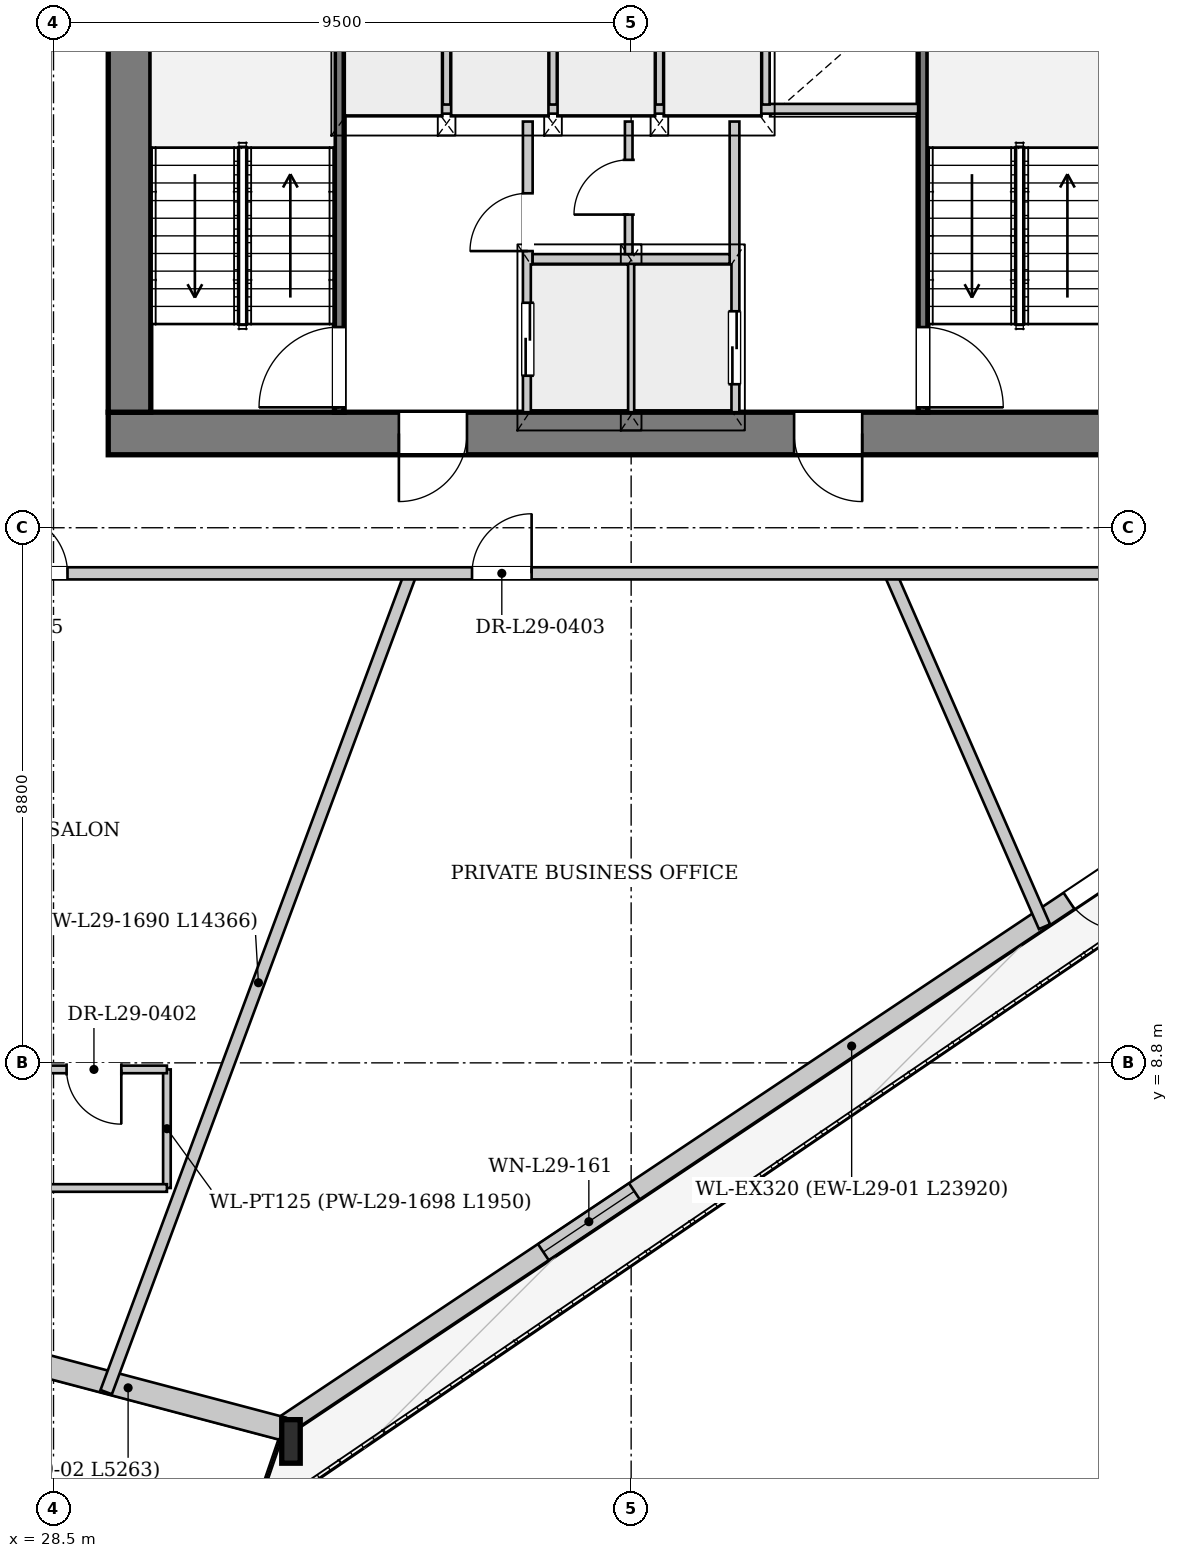
"""IFC4 building model, lengths in metres.
Left out: names, types, materials, properties, quantities, classifications, styles, units other than length and angle.
Written with IfcOpenShell. Run it as: python <this file> out.ifc"""

import sys

from ifc_helpers import new_model, si_unit, direction, frame, frame_2d, origin, origin_2d, place, context, subcontext, project, spatial, rectangle, i_section, extrude, source, transform, mapped, element, fill, save


model = new_model("IFC4")
c1 = context("Model", 3, precision=1e-05, world=origin(), true_north=direction((0.0, 1.0)))
c2 = subcontext(c1, "Body", "Model", "MODEL_VIEW")
j1 = project(units=[si_unit("LENGTHUNIT", "METRE"), si_unit("PLANEANGLEUNIT", "RADIAN")], contexts=[c1])
p1 = place(None, origin())
s1 = spatial("IfcSite", under=j1, at=p1, CompositionType="ELEMENT")
p2 = place(p1, origin())
s2 = spatial("IfcBuilding", under=s1, at=p2, CompositionType="ELEMENT")
p3 = place(p2, frame((0.0, 0.0, 112.8)))
s3 = spatial("IfcBuildingStorey", under=s2, at=p3, CompositionType="ELEMENT", Elevation=112.8)
m1 = source(origin(), c2, "Body", "SweptSolid", [
    extrude(i_section(OverallWidth=0.304, OverallDepth=0.716, WebThickness=0.021, FlangeThickness=0.04, at=origin_2d()), origin(), (0.0, 0.0, 1.0), 3.405),
])
p4 = place(p3, frame((32.222, 2.6, 0.0), z_axis=(0.107475750948, -0.014841547996, 0.994096922544), x_axis=(0.136793930518, 0.990599525829, 0.0)))
e1 = element("IfcColumn", 1, at=p4, inside=s3, PredefinedType="COLUMN", context=c2, shape_type="MappedRepresentation", body=[
    mapped(m1, transform((0.0, 0.0, 0.0), x_axis=(1.0, 0.0, 0.0), y_axis=(0.0, 1.0, 0.0), z_axis=(0.0, 0.0, 1.0), scale=1.0)),
])
p5 = place(p3, frame((52.022, 16.023, 0.0), z_axis=(0.0, 0.0, 1.0), x_axis=(-0.831442115586, -0.55561138256, 0.0)))
e2 = element("IfcWall", 2, at=p5, inside=s3, PredefinedType="SOLIDWALL", context=c2, shape_type="SweptSolid", body=[
    extrude(rectangle(XDim=23.92, YDim=0.32, at=frame_2d((11.96, 0.0))), origin(), (0.0, 0.0, 1.0), 2.692),
])
p6 = place(p5, frame((7.104, 0.0, 0.0)))
e3 = element("IfcOpeningElement", 3, at=p6, cuts=e2, PredefinedType="OPENING", context=c2, shape_type="SweptSolid", body=[
    extrude(rectangle(XDim=1.1, YDim=2.3, at=frame_2d((0.55, 1.15))), frame((0.0, 0.17, 0.0), z_axis=(0.0, -1.0, 0.0), x_axis=(1.0, 0.0, 0.0)), (0.0, 0.0, 1.0), 0.34),
])
p7 = place(p5, frame((16.801, 0.0, 0.372)))
e4 = element("IfcOpeningElement", 4, at=p7, cuts=e2, PredefinedType="OPENING", context=c2, shape_type="SweptSolid", body=[
    extrude(rectangle(XDim=1.8, YDim=2.2, at=frame_2d((0.9, 1.1))), frame((0.0, 0.17, 0.0), z_axis=(0.0, -1.0, 0.0), x_axis=(1.0, 0.0, 0.0)), (0.0, 0.0, 1.0), 0.34),
])
p8 = place(p3, frame((32.271, 2.783, 0.0), z_axis=(0.0, 0.0, 1.0), x_axis=(-0.966828311794, 0.255427123686, 0.0)))
e5 = element("IfcWall", 5, at=p8, inside=s3, PredefinedType="SOLIDWALL", context=c2, shape_type="SweptSolid", body=[
    extrude(rectangle(XDim=5.263, YDim=0.38, at=frame_2d((2.631, 0.0))), origin(), (0.0, 0.0, 1.0), 2.692),
])
p9 = place(p3, frame((46.6, 19.15, 0.0), z_axis=(0.0, 0.0, 1.0), x_axis=(-1.0, 0.0, 0.0)))
e6 = element("IfcWall", 6, at=p9, inside=s3, PredefinedType="SHEAR", context=c2, shape_type="SweptSolid", body=[
    extrude(rectangle(XDim=17.2, YDim=0.7, at=frame_2d((8.6, 0.0))), origin(), (0.0, 0.0, 1.0), 3.3),
])
p10 = place(p9, frame((4.8, 0.0, 0.0)))
e7 = element("IfcOpeningElement", 7, at=p10, cuts=e6, PredefinedType="OPENING", context=c2, shape_type="SweptSolid", body=[
    extrude(rectangle(XDim=1.12, YDim=2.25, at=frame_2d((0.56, 1.125))), frame((0.0, 0.36, 0.0), z_axis=(0.0, -1.0, 0.0), x_axis=(1.0, 0.0, 0.0)), (0.0, 0.0, 1.0), 0.72),
])
p11 = place(p9, frame((11.3, 0.0, 0.0)))
e8 = element("IfcOpeningElement", 8, at=p11, cuts=e6, PredefinedType="OPENING", context=c2, shape_type="SweptSolid", body=[
    extrude(rectangle(XDim=1.12, YDim=2.25, at=frame_2d((0.56, 1.125))), frame((0.0, 0.36, 0.0), z_axis=(0.0, -1.0, 0.0), x_axis=(1.0, 0.0, 0.0)), (0.0, 0.0, 1.0), 0.72),
])
p12 = place(p3, frame((29.75, 19.5, 0.0), z_axis=(0.0, 0.0, 1.0), x_axis=(0.0, 1.0, 0.0)))
e9 = element("IfcWall", 9, at=p12, inside=s3, PredefinedType="SHEAR", context=c2, shape_type="SweptSolid", body=[
    extrude(rectangle(XDim=14.2, YDim=0.7, at=frame_2d((7.1, 0.0))), origin(), (0.0, 0.0, 1.0), 3.3),
])
p13 = place(p12, frame((7.42, 0.0, 0.0)))
e10 = element("IfcOpeningElement", 10, at=p13, cuts=e9, PredefinedType="OPENING", context=c2, shape_type="SweptSolid", body=[
    extrude(rectangle(XDim=1.6, YDim=2.2, at=frame_2d((0.8, 1.1))), frame((0.0, 0.36, 0.0), z_axis=(0.0, -1.0, 0.0), x_axis=(1.0, 0.0, 0.0)), (0.0, 0.0, 1.0), 0.72),
])
p14 = place(p3, frame((33.2, 19.5, 0.0), z_axis=(0.0, 0.0, 1.0), x_axis=(0.0, 1.0, 0.0)))
e11 = element("IfcWall", 11, at=p14, inside=s3, PredefinedType="PARTITIONING", context=c2, shape_type="SweptSolid", body=[
    extrude(rectangle(XDim=7.46, YDim=0.16, at=frame_2d((3.73, 0.0))), origin(), (0.0, 0.0, 1.0), 3.3),
])
p15 = place(p14, frame((0.08, 0.0, 0.0)))
e12 = element("IfcOpeningElement", 12, at=p15, cuts=e11, PredefinedType="OPENING", context=c2, shape_type="SweptSolid", body=[
    extrude(rectangle(XDim=1.32, YDim=2.2, at=frame_2d((0.66, 1.1))), frame((0.0, 0.09, 0.0), z_axis=(0.0, -1.0, 0.0), x_axis=(1.0, 0.0, 0.0)), (0.0, 0.0, 1.0), 0.18),
])
p16 = place(p3, frame((42.8, 26.96, 0.0), z_axis=(0.0, 0.0, 1.0), x_axis=(0.0, -1.0, 0.0)))
e13 = element("IfcWall", 13, at=p16, inside=s3, PredefinedType="PARTITIONING", context=c2, shape_type="SweptSolid", body=[
    extrude(rectangle(XDim=7.46, YDim=0.16, at=frame_2d((3.73, 0.0))), origin(), (0.0, 0.0, 1.0), 3.3),
])
p17 = place(p16, frame((6.06, 0.0, 0.0)))
e14 = element("IfcOpeningElement", 14, at=p17, cuts=e13, PredefinedType="OPENING", context=c2, shape_type="SweptSolid", body=[
    extrude(rectangle(XDim=1.32, YDim=2.2, at=frame_2d((0.66, 1.1))), frame((0.0, 0.09, 0.0), z_axis=(0.0, -1.0, 0.0), x_axis=(1.0, 0.0, 0.0)), (0.0, 0.0, 1.0), 0.18),
])
p18 = place(p3, frame((36.3, 19.5, 0.0), z_axis=(0.0, 0.0, 1.0), x_axis=(0.0, 1.0, 0.0)))
e15 = element("IfcWall", 15, at=p18, inside=s3, PredefinedType="PARTITIONING", context=c2, shape_type="SweptSolid", body=[
    extrude(rectangle(XDim=4.78, YDim=0.16, at=frame_2d((2.39, 0.0))), origin(), (0.0, 0.0, 1.0), 3.3),
])
p19 = place(p18, frame((0.6, 0.0, 0.0)))
e16 = element("IfcOpeningElement", 16, at=p19, cuts=e15, PredefinedType="OPENING", context=c2, shape_type="SweptSolid", body=[
    extrude(rectangle(XDim=1.2, YDim=2.2, at=frame_2d((0.6, 1.1))), frame((0.0, 0.09, 0.0), z_axis=(0.0, -1.0, 0.0), x_axis=(1.0, 0.0, 0.0)), (0.0, 0.0, 1.0), 0.18),
])
p20 = place(p18, frame((2.65, 0.0, 0.0)))
e17 = element("IfcOpeningElement", 17, at=p20, cuts=e15, PredefinedType="OPENING", context=c2, shape_type="SweptSolid", body=[
    extrude(rectangle(XDim=0.95, YDim=2.1, at=frame_2d((0.475, 1.05))), frame((0.0, 0.09, 0.0), z_axis=(0.0, -1.0, 0.0), x_axis=(1.0, 0.0, 0.0)), (0.0, 0.0, 1.0), 0.18),
])
p21 = place(p3, frame((39.7, 24.28, 0.0), z_axis=(0.0, 0.0, 1.0), x_axis=(0.0, -1.0, 0.0)))
e18 = element("IfcWall", 18, at=p21, inside=s3, PredefinedType="PARTITIONING", context=c2, shape_type="SweptSolid", body=[
    extrude(rectangle(XDim=4.78, YDim=0.16, at=frame_2d((2.39, 0.0))), origin(), (0.0, 0.0, 1.0), 3.3),
])
p22 = place(p21, frame((3.12, 0.0, 0.0)))
e19 = element("IfcOpeningElement", 19, at=p22, cuts=e18, PredefinedType="OPENING", context=c2, shape_type="SweptSolid", body=[
    extrude(rectangle(XDim=1.2, YDim=2.2, at=frame_2d((0.6, 1.1))), frame((0.0, 0.09, 0.0), z_axis=(0.0, -1.0, 0.0), x_axis=(1.0, 0.0, 0.0)), (0.0, 0.0, 1.0), 0.18),
])
p23 = place(p3, frame((38.0, 19.5, 0.0), z_axis=(0.0, 0.0, 1.0), x_axis=(0.0, 1.0, 0.0)))
e20 = element("IfcWall", 20, at=p23, inside=s3, PredefinedType="PARTITIONING", context=c2, shape_type="SweptSolid", body=[
    extrude(rectangle(XDim=2.46, YDim=0.125, at=frame_2d((1.23, 0.0))), origin(), (0.0, 0.0, 1.0), 3.3),
])
p24 = place(p3, frame((36.38, 22.02, 0.0), z_axis=(0.0, 0.0, 1.0), x_axis=(1.0, 0.0, 0.0)))
e21 = element("IfcWall", 21, at=p24, inside=s3, PredefinedType="PARTITIONING", context=c2, shape_type="SweptSolid", body=[
    extrude(rectangle(XDim=3.24, YDim=0.16, at=frame_2d((1.62, 0.0))), origin(), (0.0, 0.0, 1.0), 3.3),
])
p25 = place(p3, frame((33.28, 24.49, 0.0), z_axis=(0.0, 0.0, 1.0), x_axis=(1.0, 0.0, 0.0)))
e22 = element("IfcWall", 22, at=p25, inside=s3, PredefinedType="PARTITIONING", context=c2, shape_type="SweptSolid", body=[
    extrude(rectangle(XDim=9.44, YDim=0.16, at=frame_2d((4.72, 0.0))), origin(), (0.0, 0.0, 1.0), 3.3),
])
p26 = place(p3, frame((37.96, 22.1, 0.0), z_axis=(0.0, 0.0, 1.0), x_axis=(0.0, 1.0, 0.0)))
e23 = element("IfcWall", 23, at=p26, inside=s3, PredefinedType="PARTITIONING", context=c2, shape_type="SweptSolid", body=[
    extrude(rectangle(XDim=2.18, YDim=0.125, at=frame_2d((1.09, 0.0))), origin(), (0.0, 0.0, 1.0), 3.3),
])
p27 = place(p26, frame((0.65, 0.0, 0.0)))
e24 = element("IfcOpeningElement", 24, at=p27, cuts=e23, PredefinedType="OPENING", context=c2, shape_type="SweptSolid", body=[
    extrude(rectangle(XDim=0.9, YDim=2.1, at=frame_2d((0.45, 1.05))), frame((0.0, 0.073, 0.0), z_axis=(0.0, -1.0, 0.0), x_axis=(1.0, 0.0, 0.0)), (0.0, 0.0, 1.0), 0.145),
])
for number, where, z_axis, x_axis in (
    (25, (34.965, 24.56, 0.0), (0.0, 0.0, 1.0), (0.0, 1.0, 0.0)),
    (26, (36.715, 24.56, 0.0), (0.0, 0.0, 1.0), (0.0, 1.0, 0.0)),
    (27, (38.465, 24.56, 0.0), (0.0, 0.0, 1.0), (0.0, 1.0, 0.0)),
    (28, (40.215, 24.56, 0.0), (0.0, 0.0, 1.0), (0.0, 1.0, 0.0)),
):
    element("IfcWall", number, at=place(p3, frame(where, z_axis=z_axis, x_axis=x_axis)), inside=s3, PredefinedType="PARTITIONING", context=c2, shape_type="SweptSolid", body=[
        extrude(rectangle(XDim=2.31, YDim=0.125, at=frame_2d((1.155, 0.0))), origin(), (0.0, 0.0, 1.0), 3.3),
    ])
p28 = place(p3, frame((34.374, 16.85, 0.0), z_axis=(0.0, 0.0, 1.0), x_axis=(-0.348574362272, -0.937281128566, 0.0)))
e29 = element("IfcWall", 29, at=p28, inside=s3, PredefinedType="PARTITIONING", context=c2, shape_type="SweptSolid", body=[
    extrude(rectangle(XDim=14.366, YDim=0.2, at=frame_2d((7.183, 0.0))), origin(), (0.0, 0.0, 1.0), 3.3),
])
p29 = place(p3, frame((42.26, 16.85, 0.0), z_axis=(0.0, 0.0, 1.0), x_axis=(0.400317853683, -0.916376350646, 0.0)))
e30 = element("IfcWall", 30, at=p29, inside=s3, PredefinedType="PARTITIONING", context=c2, shape_type="SweptSolid", body=[
    extrude(rectangle(XDim=6.341, YDim=0.2, at=frame_2d((3.17, 0.0))), origin(), (0.0, 0.0, 1.0), 3.3),
])
p30 = place(p3, frame((30.365, 6.742, 0.0), z_axis=(0.0, 0.0, 1.0), x_axis=(0.0, 1.0, 0.0)))
e31 = element("IfcWall", 31, at=p30, inside=s3, PredefinedType="PARTITIONING", context=c2, shape_type="SweptSolid", body=[
    extrude(rectangle(XDim=1.95, YDim=0.125, at=frame_2d((0.975, 0.0))), origin(), (0.0, 0.0, 1.0), 3.3),
])
p31 = place(p3, frame((30.365, 8.692, 0.0), z_axis=(0.0, 0.0, 1.0), x_axis=(-1.0, 0.0, 0.0)))
e32 = element("IfcWall", 32, at=p31, inside=s3, PredefinedType="PARTITIONING", context=c2, shape_type="SweptSolid", body=[
    extrude(rectangle(XDim=2.4, YDim=0.125, at=frame_2d((1.2, 0.0))), origin(), (0.0, 0.0, 1.0), 3.3),
])
p32 = place(p31, frame((0.75, 0.0, 0.0)))
e33 = element("IfcOpeningElement", 33, at=p32, cuts=e32, PredefinedType="OPENING", context=c2, shape_type="SweptSolid", body=[
    extrude(rectangle(XDim=0.9, YDim=2.1, at=frame_2d((0.45, 1.05))), frame((0.0, 0.073, 0.0), z_axis=(0.0, -1.0, 0.0), x_axis=(1.0, 0.0, 0.0)), (0.0, 0.0, 1.0), 0.145),
])
p33 = place(p3, frame((27.965, 6.742, 0.0), z_axis=(0.0, 0.0, 1.0), x_axis=(1.0, 0.0, 0.0)))
e34 = element("IfcWall", 34, at=p33, inside=s3, PredefinedType="PARTITIONING", context=c2, shape_type="SweptSolid", body=[
    extrude(rectangle(XDim=2.4, YDim=0.125, at=frame_2d((1.2, 0.0))), origin(), (0.0, 0.0, 1.0), 3.3),
])
p34 = place(p3, frame((27.45, 16.85, 0.0), z_axis=(0.0, 0.0, 1.0), x_axis=(1.0, 0.0, 0.0)))
e35 = element("IfcWall", 35, at=p34, inside=s3, PredefinedType="PARTITIONING", context=c2, shape_type="SweptSolid", body=[
    extrude(rectangle(XDim=21.1, YDim=0.2, at=frame_2d((10.55, 0.0))), origin(), (0.0, 0.0, 1.0), 2.985),
])
p35 = place(p34, frame((7.933, 0.0, 0.0)))
e36 = element("IfcOpeningElement", 36, at=p35, cuts=e35, PredefinedType="OPENING", context=c2, shape_type="SweptSolid", body=[
    extrude(rectangle(XDim=0.98, YDim=2.15, at=frame_2d((0.49, 1.075))), frame((0.0, 0.11, 0.0), z_axis=(0.0, -1.0, 0.0), x_axis=(1.0, 0.0, 0.0)), (0.0, 0.0, 1.0), 0.22),
])
p36 = place(p34, frame((19.82, 0.0, 0.0)))
e37 = element("IfcOpeningElement", 37, at=p36, cuts=e35, PredefinedType="OPENING", context=c2, shape_type="SweptSolid", body=[
    extrude(rectangle(XDim=0.98, YDim=2.15, at=frame_2d((0.49, 1.075))), frame((0.0, 0.11, 0.0), z_axis=(0.0, -1.0, 0.0), x_axis=(1.0, 0.0, 0.0)), (0.0, 0.0, 1.0), 0.22),
])
p37 = place(p34, frame((0.3, 0.0, 0.0)))
e38 = element("IfcOpeningElement", 38, at=p37, cuts=e35, PredefinedType="OPENING", context=c2, shape_type="SweptSolid", body=[
    extrude(rectangle(XDim=0.98, YDim=2.15, at=frame_2d((0.49, 1.075))), frame((0.0, 0.11, 0.0), z_axis=(0.0, -1.0, 0.0), x_axis=(1.0, 0.0, 0.0)), (0.0, 0.0, 1.0), 0.22),
])
m2 = source(origin(), c2, "Body", "SweptSolid", [
    extrude(rectangle(XDim=1.1, YDim=2.3, at=frame_2d((0.55, 1.15))), frame((0.0, 0.025, 0.0), z_axis=(0.0, -1.0, 0.0), x_axis=(1.0, 0.0, 0.0)), (0.0, 0.0, 1.0), 0.05),
])
p38 = place(p6, origin())
e39 = element("IfcDoor", 39, at=p38, inside=s3, OperationType="SINGLE_SWING_LEFT", PredefinedType="DOOR", context=c2, shape_type="MappedRepresentation", body=[
    mapped(m2, transform((0.0, 0.0, 0.0), x_axis=(1.0, 0.0, 0.0), y_axis=(0.0, 1.0, 0.0), z_axis=(0.0, 0.0, 1.0), scale=1.0)),
])
fill(e3, e39)
m3 = source(origin(), c2, "Body", "SweptSolid", [
    extrude(rectangle(XDim=1.8, YDim=2.2, at=frame_2d((0.9, 1.1))), frame((0.0, 0.03, 0.0), z_axis=(0.0, -1.0, 0.0), x_axis=(1.0, 0.0, 0.0)), (0.0, 0.0, 1.0), 0.06),
])
p39 = place(p7, origin())
e40 = element("IfcWindow", 40, at=p39, inside=s3, PartitioningType="SINGLE_PANEL", PredefinedType="WINDOW", context=c2, shape_type="MappedRepresentation", body=[
    mapped(m3, transform((0.0, 0.0, 0.0), x_axis=(1.0, 0.0, 0.0), y_axis=(0.0, 1.0, 0.0), z_axis=(0.0, 0.0, 1.0), scale=1.0)),
])
fill(e4, e40)
m4 = source(origin(), c2, "Body", "SweptSolid", [
    extrude(rectangle(XDim=1.12, YDim=2.25, at=frame_2d((0.56, 1.125))), frame((0.0, 0.025, 0.0), z_axis=(0.0, -1.0, 0.0), x_axis=(1.0, 0.0, 0.0)), (0.0, 0.0, 1.0), 0.05),
])
p40 = place(p10, origin())
e41 = element("IfcDoor", 41, at=p40, inside=s3, OperationType="SINGLE_SWING_LEFT", PredefinedType="DOOR", context=c2, shape_type="MappedRepresentation", body=[
    mapped(m4, transform((0.0, 0.0, 0.0), x_axis=(1.0, 0.0, 0.0), y_axis=(0.0, 1.0, 0.0), z_axis=(0.0, 0.0, 1.0), scale=1.0)),
])
fill(e7, e41)
p41 = place(p11, origin())
e42 = element("IfcDoor", 42, at=p41, inside=s3, OperationType="SINGLE_SWING_RIGHT", PredefinedType="DOOR", context=c2, shape_type="MappedRepresentation", body=[
    mapped(m4, transform((0.0, 0.0, 0.0), x_axis=(1.0, 0.0, 0.0), y_axis=(0.0, 1.0, 0.0), z_axis=(0.0, 0.0, 1.0), scale=1.0)),
])
fill(e8, e42)
m5 = source(origin(), c2, "Body", "SweptSolid", [
    extrude(rectangle(XDim=1.32, YDim=2.2, at=frame_2d((0.66, 1.1))), frame((0.0, 0.025, 0.0), z_axis=(0.0, -1.0, 0.0), x_axis=(1.0, 0.0, 0.0)), (0.0, 0.0, 1.0), 0.05),
])
p42 = place(p15, origin())
e43 = element("IfcDoor", 43, at=p42, inside=s3, OperationType="SINGLE_SWING_LEFT", PredefinedType="DOOR", context=c2, shape_type="MappedRepresentation", body=[
    mapped(m5, transform((0.0, 0.0, 0.0), x_axis=(1.0, 0.0, 0.0), y_axis=(0.0, 1.0, 0.0), z_axis=(0.0, 0.0, 1.0), scale=1.0)),
])
fill(e12, e43)
p43 = place(p17, origin())
e44 = element("IfcDoor", 44, at=p43, inside=s3, OperationType="SINGLE_SWING_RIGHT", PredefinedType="DOOR", context=c2, shape_type="MappedRepresentation", body=[
    mapped(m5, transform((0.0, 0.0, 0.0), x_axis=(1.0, 0.0, 0.0), y_axis=(0.0, 1.0, 0.0), z_axis=(0.0, 0.0, 1.0), scale=1.0)),
])
fill(e14, e44)
m6 = source(origin(), c2, "Body", "SweptSolid", [
    extrude(rectangle(XDim=1.2, YDim=2.2, at=frame_2d((0.6, 1.1))), frame((0.0, 0.025, 0.0), z_axis=(0.0, -1.0, 0.0), x_axis=(1.0, 0.0, 0.0)), (0.0, 0.0, 1.0), 0.05),
])
p44 = place(p19, origin())
e45 = element("IfcDoor", 45, at=p44, inside=s3, OperationType="DOUBLE_DOOR_SLIDING", PredefinedType="DOOR", context=c2, shape_type="MappedRepresentation", body=[
    mapped(m6, transform((0.0, 0.0, 0.0), x_axis=(1.0, 0.0, 0.0), y_axis=(0.0, 1.0, 0.0), z_axis=(0.0, 0.0, 1.0), scale=1.0)),
])
fill(e16, e45)
m7 = source(origin(), c2, "Body", "SweptSolid", [
    extrude(rectangle(XDim=0.95, YDim=2.1, at=frame_2d((0.475, 1.05))), frame((0.0, 0.025, 0.0), z_axis=(0.0, -1.0, 0.0), x_axis=(1.0, 0.0, 0.0)), (0.0, 0.0, 1.0), 0.05),
])
p45 = place(p20, origin())
e46 = element("IfcDoor", 46, at=p45, inside=s3, OperationType="SINGLE_SWING_LEFT", PredefinedType="DOOR", context=c2, shape_type="MappedRepresentation", body=[
    mapped(m7, transform((0.0, 0.0, 0.0), x_axis=(1.0, 0.0, 0.0), y_axis=(0.0, 1.0, 0.0), z_axis=(0.0, 0.0, 1.0), scale=1.0)),
])
fill(e17, e46)
m8 = source(origin(), c2, "Body", "SweptSolid", [
    extrude(rectangle(XDim=0.9, YDim=2.1, at=frame_2d((0.45, 1.05))), frame((0.0, 0.025, 0.0), z_axis=(0.0, -1.0, 0.0), x_axis=(1.0, 0.0, 0.0)), (0.0, 0.0, 1.0), 0.05),
])
p46 = place(p27, origin())
e47 = element("IfcDoor", 47, at=p46, inside=s3, OperationType="SINGLE_SWING_LEFT", PredefinedType="DOOR", context=c2, shape_type="MappedRepresentation", body=[
    mapped(m8, transform((0.0, 0.0, 0.0), x_axis=(1.0, 0.0, 0.0), y_axis=(0.0, 1.0, 0.0), z_axis=(0.0, 0.0, 1.0), scale=1.0)),
])
fill(e24, e47)
p47 = place(p22, origin())
e48 = element("IfcDoor", 48, at=p47, inside=s3, OperationType="DOUBLE_DOOR_SLIDING", PredefinedType="DOOR", context=c2, shape_type="MappedRepresentation", body=[
    mapped(m6, transform((0.0, 0.0, 0.0), x_axis=(1.0, 0.0, 0.0), y_axis=(0.0, 1.0, 0.0), z_axis=(0.0, 0.0, 1.0), scale=1.0)),
])
fill(e19, e48)
p48 = place(p32, origin())
e49 = element("IfcDoor", 49, at=p48, inside=s3, OperationType="SINGLE_SWING_LEFT", PredefinedType="DOOR", context=c2, shape_type="MappedRepresentation", body=[
    mapped(m8, transform((0.0, 0.0, 0.0), x_axis=(1.0, 0.0, 0.0), y_axis=(0.0, 1.0, 0.0), z_axis=(0.0, 0.0, 1.0), scale=1.0)),
])
fill(e33, e49)
m9 = source(origin(), c2, "Body", "SweptSolid", [
    extrude(rectangle(XDim=0.98, YDim=2.15, at=frame_2d((0.49, 1.075))), frame((0.0, 0.025, 0.0), z_axis=(0.0, -1.0, 0.0), x_axis=(1.0, 0.0, 0.0)), (0.0, 0.0, 1.0), 0.05),
])
p49 = place(p35, origin())
e50 = element("IfcDoor", 50, at=p49, inside=s3, OperationType="SINGLE_SWING_RIGHT", PredefinedType="DOOR", context=c2, shape_type="MappedRepresentation", body=[
    mapped(m9, transform((0.0, 0.0, 0.0), x_axis=(1.0, 0.0, 0.0), y_axis=(0.0, 1.0, 0.0), z_axis=(0.0, 0.0, 1.0), scale=1.0)),
])
fill(e36, e50)
p50 = place(p37, origin())
e51 = element("IfcDoor", 51, at=p50, inside=s3, OperationType="SINGLE_SWING_LEFT", PredefinedType="DOOR", context=c2, shape_type="MappedRepresentation", body=[
    mapped(m9, transform((0.0, 0.0, 0.0), x_axis=(1.0, 0.0, 0.0), y_axis=(0.0, 1.0, 0.0), z_axis=(0.0, 0.0, 1.0), scale=1.0)),
])
fill(e38, e51)
save(model, sys.argv[1])
